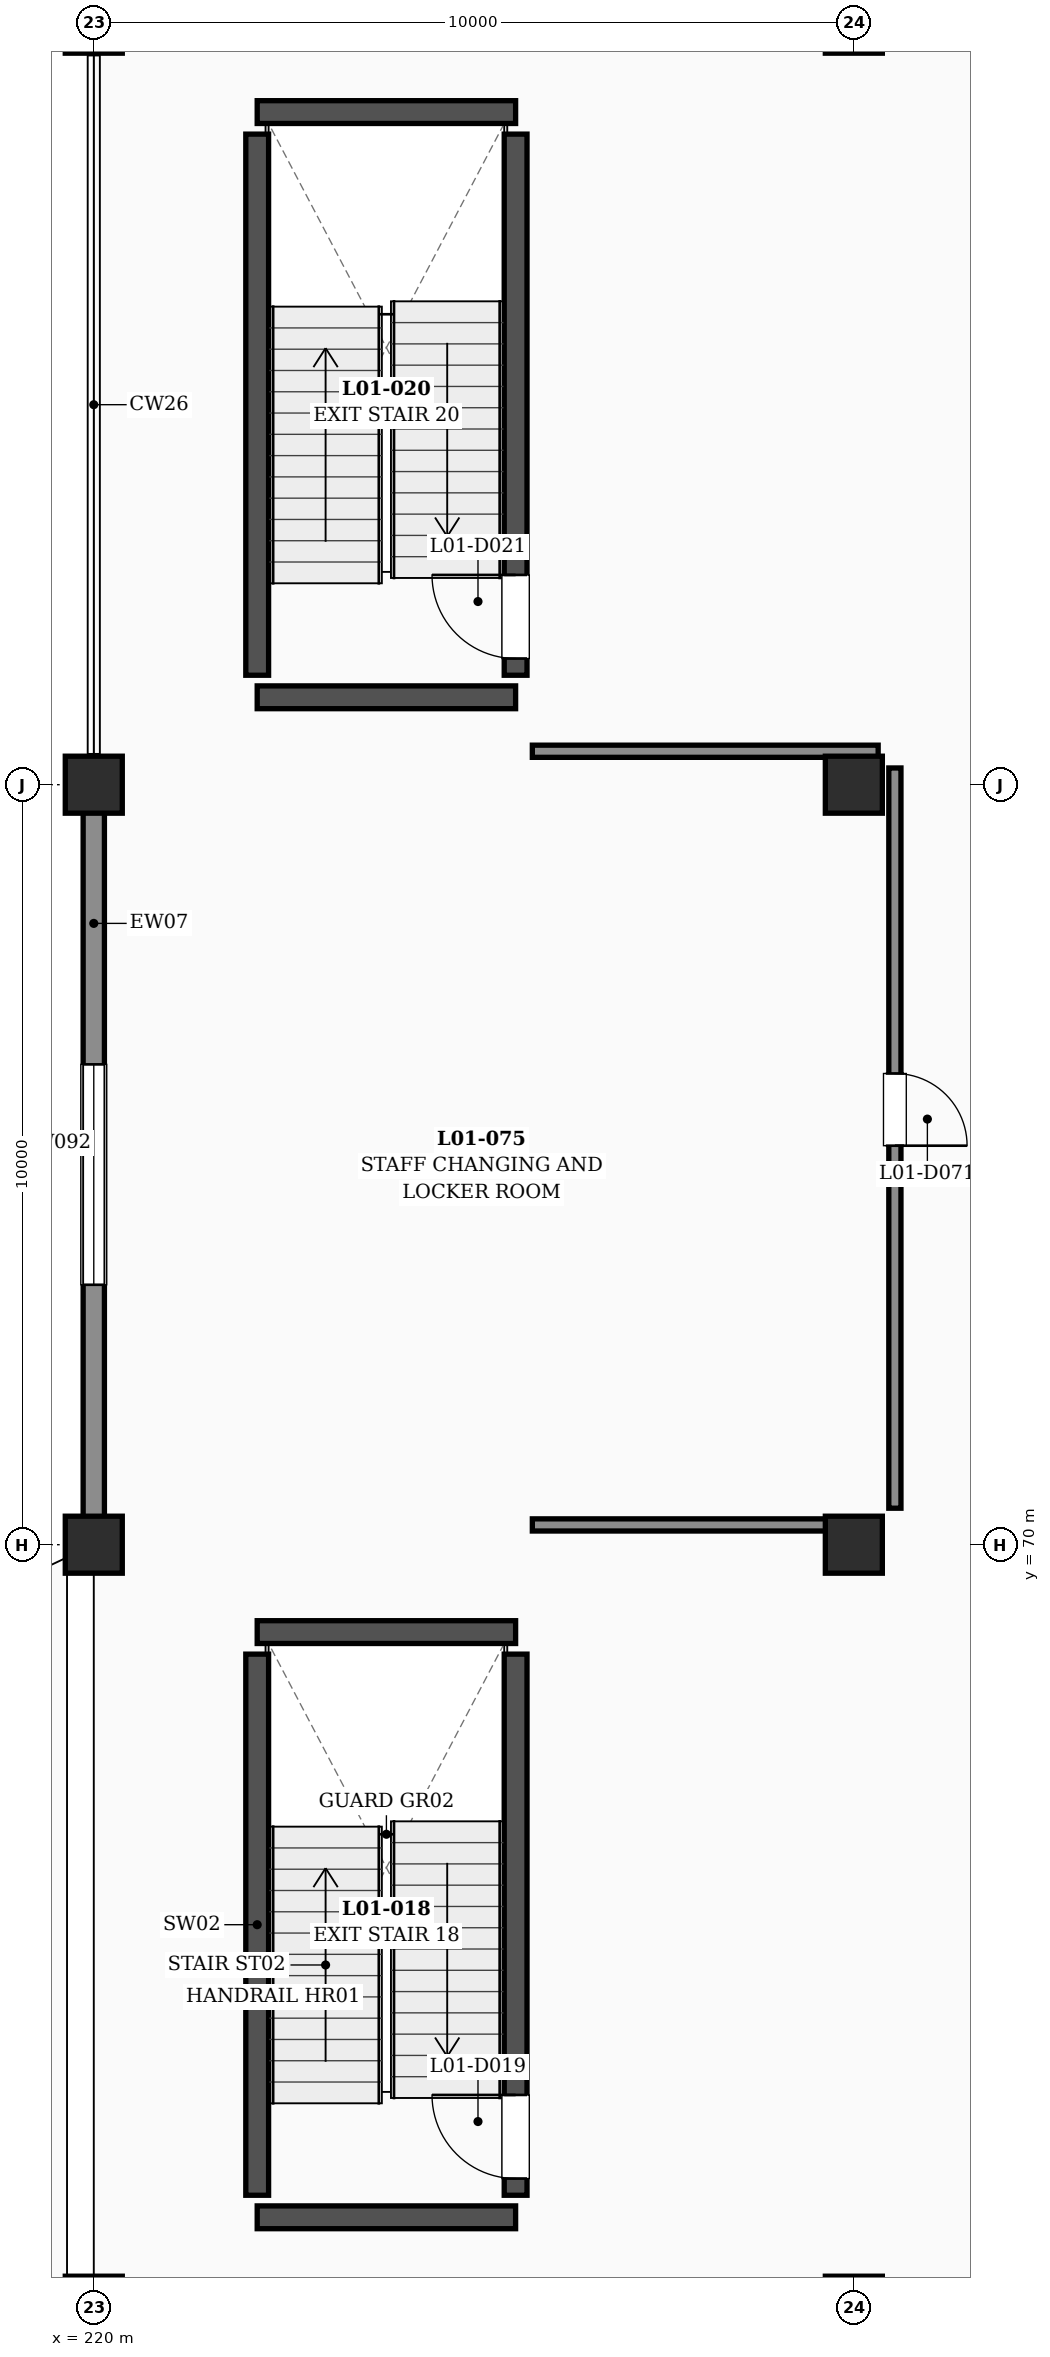
"""IFC4 building model, lengths in metres.
Left out: names, types, materials, properties, quantities, classifications, styles, units other than length and angle.
Written with IfcOpenShell. Run it as: python <this file> out.ifc"""

import sys

from ifc_helpers import new_model, si_unit, direction, frame, frame_2d, origin, origin_2d, place, context, subcontext, project, spatial, rectangle, extrude, element, fill, save


model = new_model("IFC4")
c1 = context("Model", 3, precision=1e-05, world=origin(), true_north=direction((0.0, 1.0)))
c2 = subcontext(c1, "Body", "Model", "MODEL_VIEW")
j1 = project(units=[si_unit("LENGTHUNIT", "METRE"), si_unit("PLANEANGLEUNIT", "RADIAN")], contexts=[c1])
p1 = place(None, origin())
s1 = spatial("IfcSite", under=j1, at=p1, CompositionType="ELEMENT")
p2 = place(p1, origin())
s2 = spatial("IfcBuilding", under=s1, at=p2, CompositionType="ELEMENT")
p3 = place(p2, frame((0.0, 0.0, 6.0)))
s3 = spatial("IfcBuildingStorey", under=s2, at=p3, CompositionType="ELEMENT", Elevation=6.0)
for number, where, z_axis, x_axis in (
    (1, (220.0, 60.0, 0.0), (0.0, 0.0, 1.0), (1.0, 0.0, 0.0)),
    (2, (220.0, 70.0, 0.0), (0.0, 0.0, 1.0), (1.0, 0.0, 0.0)),
    (3, (220.0, 80.0, 0.0), (0.0, 0.0, 1.0), (1.0, 0.0, 0.0)),
    (4, (220.0, 90.0, 0.0), (0.0, 0.0, 1.0), (1.0, 0.0, 0.0)),
    (5, (230.0, 60.0, 0.0), (0.0, 0.0, 1.0), (1.0, 0.0, 0.0)),
    (6, (230.0, 70.0, 0.0), (0.0, 0.0, 1.0), (1.0, 0.0, 0.0)),
    (7, (230.0, 80.0, 0.0), (0.0, 0.0, 1.0), (1.0, 0.0, 0.0)),
    (8, (230.0, 90.0, 0.0), (0.0, 0.0, 1.0), (1.0, 0.0, 0.0)),
):
    element("IfcColumn", number, at=place(p3, frame(where, z_axis=z_axis, x_axis=x_axis)), inside=s3, PredefinedType="COLUMN", context=c2, shape_type="SweptSolid", body=[
        extrude(rectangle(XDim=0.75, YDim=0.75, at=origin_2d()), origin(), (0.0, 0.0, 1.0), 4.8),
    ])
p4 = place(p3, frame((220.0, 70.22, 0.0), z_axis=(0.0, 0.0, 1.0), x_axis=(0.0, 1.0, 0.0)))
e9 = element("IfcWall", 9, at=p4, inside=s3, PredefinedType="SOLIDWALL", context=c2, shape_type="SweptSolid", body=[
    extrude(rectangle(XDim=9.56, YDim=0.28, at=frame_2d((4.78, 0.0))), origin(), (0.0, 0.0, 1.0), 3.76),
])
p5 = place(p4, frame((3.2, 0.0, 0.95)))
e10 = element("IfcOpeningElement", 10, at=p5, cuts=e9, PredefinedType="OPENING", context=c2, shape_type="SweptSolid", body=[
    extrude(rectangle(XDim=2.9, YDim=2.2, at=frame_2d((1.45, 1.1))), frame((0.0, 0.15, 0.0), z_axis=(0.0, -1.0, 0.0), x_axis=(1.0, 0.0, 0.0)), (0.0, 0.0, 1.0), 0.3),
])
for number, where, z_axis, x_axis in (
    (11, (222.15, 61.15, 0.0), (0.0, 0.0, 1.0), (1.0, 0.0, 0.0)),
    (12, (222.15, 68.85, 0.0), (0.0, 0.0, 1.0), (1.0, 0.0, 0.0)),
):
    element("IfcWall", number, at=place(p3, frame(where, z_axis=z_axis, x_axis=x_axis)), inside=s3, PredefinedType="SHEAR", context=c2, shape_type="SweptSolid", body=[
        extrude(rectangle(XDim=3.4, YDim=0.3, at=frame_2d((1.7, 0.0))), origin(), (0.0, 0.0, 1.0), 4.8),
    ])
p6 = place(p3, frame((222.15, 61.44, 0.0), z_axis=(0.0, 0.0, 1.0), x_axis=(0.0, 1.0, 0.0)))
e13 = element("IfcWall", 13, at=p6, inside=s3, PredefinedType="SHEAR", context=c2, shape_type="SweptSolid", body=[
    extrude(rectangle(XDim=7.12, YDim=0.3, at=frame_2d((3.56, 0.0))), origin(), (0.0, 0.0, 1.0), 4.8),
])
p7 = place(p3, frame((225.55, 61.44, 0.0), z_axis=(0.0, 0.0, 1.0), x_axis=(0.0, 1.0, 0.0)))
e14 = element("IfcWall", 14, at=p7, inside=s3, PredefinedType="SHEAR", context=c2, shape_type="SweptSolid", body=[
    extrude(rectangle(XDim=7.12, YDim=0.3, at=frame_2d((3.56, 0.0))), origin(), (0.0, 0.0, 1.0), 4.8),
])
p8 = place(p7, frame((0.22, 0.0, 0.0)))
e15 = element("IfcOpeningElement", 15, at=p8, cuts=e14, PredefinedType="OPENING", context=c2, shape_type="SweptSolid", body=[
    extrude(rectangle(XDim=1.1, YDim=2.2, at=frame_2d((0.55, 1.1))), frame((0.0, 0.16, 0.0), z_axis=(0.0, -1.0, 0.0), x_axis=(1.0, 0.0, 0.0)), (0.0, 0.0, 1.0), 0.32),
])
for number, where, z_axis, x_axis in (
    (16, (222.15, 81.15, 0.0), (0.0, 0.0, 1.0), (1.0, 0.0, 0.0)),
    (17, (222.15, 88.85, 0.0), (0.0, 0.0, 1.0), (1.0, 0.0, 0.0)),
):
    element("IfcWall", number, at=place(p3, frame(where, z_axis=z_axis, x_axis=x_axis)), inside=s3, PredefinedType="SHEAR", context=c2, shape_type="SweptSolid", body=[
        extrude(rectangle(XDim=3.4, YDim=0.3, at=frame_2d((1.7, 0.0))), origin(), (0.0, 0.0, 1.0), 4.8),
    ])
p9 = place(p3, frame((222.15, 81.44, 0.0), z_axis=(0.0, 0.0, 1.0), x_axis=(0.0, 1.0, 0.0)))
e18 = element("IfcWall", 18, at=p9, inside=s3, PredefinedType="SHEAR", context=c2, shape_type="SweptSolid", body=[
    extrude(rectangle(XDim=7.12, YDim=0.3, at=frame_2d((3.56, 0.0))), origin(), (0.0, 0.0, 1.0), 4.8),
])
p10 = place(p3, frame((225.55, 81.44, 0.0), z_axis=(0.0, 0.0, 1.0), x_axis=(0.0, 1.0, 0.0)))
e19 = element("IfcWall", 19, at=p10, inside=s3, PredefinedType="SHEAR", context=c2, shape_type="SweptSolid", body=[
    extrude(rectangle(XDim=7.12, YDim=0.3, at=frame_2d((3.56, 0.0))), origin(), (0.0, 0.0, 1.0), 4.8),
])
p11 = place(p10, frame((0.22, 0.0, 0.0)))
e20 = element("IfcOpeningElement", 20, at=p11, cuts=e19, PredefinedType="OPENING", context=c2, shape_type="SweptSolid", body=[
    extrude(rectangle(XDim=1.1, YDim=2.2, at=frame_2d((0.55, 1.1))), frame((0.0, 0.16, 0.0), z_axis=(0.0, -1.0, 0.0), x_axis=(1.0, 0.0, 0.0)), (0.0, 0.0, 1.0), 0.32),
])
p12 = place(p3, frame((225.77, 80.44, 0.0), z_axis=(0.0, 0.0, 1.0), x_axis=(1.0, 0.0, 0.0)))
e21 = element("IfcWall", 21, at=p12, inside=s3, PredefinedType="PARTITIONING", context=c2, shape_type="SweptSolid", body=[
    extrude(rectangle(XDim=4.55, YDim=0.16, at=frame_2d((2.275, 0.0))), origin(), (0.0, 0.0, 1.0), 4.46),
])
p13 = place(p3, frame((230.54, 80.22, 0.0), z_axis=(0.0, 0.0, 1.0), x_axis=(0.0, -1.0, 0.0)))
e22 = element("IfcWall", 22, at=p13, inside=s3, PredefinedType="PARTITIONING", context=c2, shape_type="SweptSolid", body=[
    extrude(rectangle(XDim=9.74, YDim=0.16, at=frame_2d((4.87, 0.0))), origin(), (0.0, 0.0, 1.0), 3.71),
])
p14 = place(p13, frame((4.02, 0.0, 0.0)))
e23 = element("IfcOpeningElement", 23, at=p14, cuts=e22, PredefinedType="OPENING", context=c2, shape_type="SweptSolid", body=[
    extrude(rectangle(XDim=0.95, YDim=2.15, at=frame_2d((0.475, 1.075))), frame((0.0, 0.09, 0.0), z_axis=(0.0, -1.0, 0.0), x_axis=(1.0, 0.0, 0.0)), (0.0, 0.0, 1.0), 0.18),
])
p15 = place(p3, frame((230.32, 70.26, 0.0), z_axis=(0.0, 0.0, 1.0), x_axis=(-1.0, 0.0, 0.0)))
e24 = element("IfcWall", 24, at=p15, inside=s3, PredefinedType="PARTITIONING", context=c2, shape_type="SweptSolid", body=[
    extrude(rectangle(XDim=4.55, YDim=0.16, at=frame_2d((2.275, 0.0))), origin(), (0.0, 0.0, 1.0), 3.71),
])
p16 = place(p5, origin())
e25 = element("IfcWindow", 25, at=p16, inside=s3, PartitioningType="SINGLE_PANEL", PredefinedType="WINDOW", context=c2, shape_type="SweptSolid", body=[
    extrude(rectangle(XDim=2.9, YDim=2.2, at=frame_2d((1.45, 1.1))), frame((0.0, 0.03, 0.0), z_axis=(0.0, -1.0, 0.0), x_axis=(1.0, 0.0, 0.0)), (0.0, 0.0, 1.0), 0.06),
])
fill(e10, e25)
p17 = place(p8, origin())
e26 = element("IfcDoor", 26, at=p17, inside=s3, OperationType="SINGLE_SWING_RIGHT", PredefinedType="DOOR", context=c2, shape_type="SweptSolid", body=[
    extrude(rectangle(XDim=1.1, YDim=2.2, at=frame_2d((0.55, 1.1))), frame((0.0, 0.025, 0.0), z_axis=(0.0, -1.0, 0.0), x_axis=(1.0, 0.0, 0.0)), (0.0, 0.0, 1.0), 0.05),
])
fill(e15, e26)
p18 = place(p11, origin())
e27 = element("IfcDoor", 27, at=p18, inside=s3, OperationType="SINGLE_SWING_RIGHT", PredefinedType="DOOR", context=c2, shape_type="SweptSolid", body=[
    extrude(rectangle(XDim=1.1, YDim=2.2, at=frame_2d((0.55, 1.1))), frame((0.0, 0.025, 0.0), z_axis=(0.0, -1.0, 0.0), x_axis=(1.0, 0.0, 0.0)), (0.0, 0.0, 1.0), 0.05),
])
fill(e20, e27)
p19 = place(p14, origin())
e28 = element("IfcDoor", 28, at=p19, inside=s3, OperationType="SINGLE_SWING_RIGHT", PredefinedType="DOOR", context=c2, shape_type="SweptSolid", body=[
    extrude(rectangle(XDim=0.95, YDim=2.15, at=frame_2d((0.475, 1.075))), frame((0.0, 0.025, 0.0), z_axis=(0.0, -1.0, 0.0), x_axis=(1.0, 0.0, 0.0)), (0.0, 0.0, 1.0), 0.05),
])
fill(e23, e28)
save(model, sys.argv[1])
